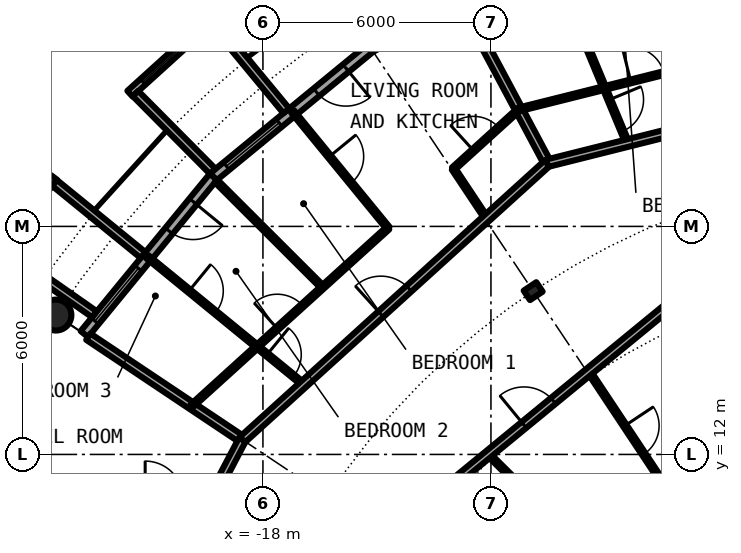
"""IFC4 building model, lengths in metres.
Left out: names, types, materials, properties, quantities, classifications, styles, units other than length and angle.
Written with IfcOpenShell. Run it as: python <this file> out.ifc"""

import sys

from ifc_helpers import new_model, si_unit, direction, frame, frame_2d, origin, origin_2d, place, context, subcontext, project, spatial, rectangle, circle, hollow_circle, i_section, extrude, element, fill, save


model = new_model("IFC4")
c1 = context("Model", 3, precision=1e-05, world=origin(), true_north=direction((0.0, 1.0)))
c2 = subcontext(c1, "Body", "Model", "MODEL_VIEW")
j1 = project(units=[si_unit("LENGTHUNIT", "METRE"), si_unit("PLANEANGLEUNIT", "RADIAN")], contexts=[c1])
p1 = place(None, origin())
s1 = spatial("IfcSite", under=j1, at=p1, CompositionType="ELEMENT")
p2 = place(p1, origin())
s2 = spatial("IfcBuilding", under=s1, at=p2, CompositionType="ELEMENT")
p3 = place(p2, frame((0.0, 0.0, 212.7)))
s3 = spatial("IfcBuildingStorey", under=s2, at=p3, CompositionType="ELEMENT", Elevation=212.7)
p4 = place(p3, frame((-23.448, 15.667, 0.0), z_axis=(0.0, 0.0, 1.0), x_axis=(1.0, 0.0, 0.0)))
e1 = element("IfcColumn", 1, at=p4, inside=s3, PredefinedType="COLUMN", context=c2, shape_type="SweptSolid", body=[
    extrude(hollow_circle(Radius=0.406, WallThickness=0.03, at=origin_2d()), origin(), (0.0, 0.0, 1.0), 3.05),
])
p5 = place(p3, frame((-10.889, 16.297, 0.0), z_axis=(0.0, 0.0, 1.0), x_axis=(-0.55557023302, 0.831469612303, 0.0)))
e2 = element("IfcColumn", 2, at=p5, inside=s3, PredefinedType="COLUMN", context=c2, shape_type="SweptSolid", body=[
    extrude(i_section(OverallWidth=0.3, OverallDepth=0.4, WebThickness=0.013, FlangeThickness=0.024, FilletRadius=0.027, at=origin_2d()), origin(), (0.0, 0.0, 1.0), 3.05),
])
p6 = place(p3, frame((-15.167, 22.699, 0.0), z_axis=(0.0, 0.0, 1.0), x_axis=(-0.773019449054, -0.634382322723, 0.0)))
e3 = element("IfcWall", 3, at=p6, inside=s3, PredefinedType="SOLIDWALL", context=c2, shape_type="SweptSolid", body=[
    extrude(rectangle(XDim=5.352, YDim=0.25, at=frame_2d((2.676, 0.0))), origin(), (0.0, 0.0, 1.0), 2.7),
])
p7 = place(p6, frame((0.841, 0.0, 0.0)))
e4 = element("IfcOpeningElement", 4, at=p7, cuts=e3, PredefinedType="OPENING", context=c2, shape_type="SweptSolid", body=[
    extrude(rectangle(XDim=1.0, YDim=2.2, at=frame_2d((0.5, 1.1))), frame((0.0, 0.135, 0.0), z_axis=(0.0, -1.0, 0.0), x_axis=(1.0, 0.0, 0.0)), (0.0, 0.0, 1.0), 0.27),
])
p8 = place(p6, frame((3.111, 0.0, 0.3)))
e5 = element("IfcOpeningElement", 5, at=p8, cuts=e3, PredefinedType="OPENING", context=c2, shape_type="SweptSolid", body=[
    extrude(rectangle(XDim=1.8, YDim=2.1, at=frame_2d((0.9, 1.05))), frame((0.0, 0.135, 0.0), z_axis=(0.0, -1.0, 0.0), x_axis=(1.0, 0.0, 0.0)), (0.0, 0.0, 1.0), 0.27),
])
p9 = place(p3, frame((-19.282, 23.503, -0.03), z_axis=(0.0, 0.0, 1.0), x_axis=(-0.740998365753, -0.671506829416, 0.0)))
e6 = element("IfcWall", 6, at=p9, inside=s3, PredefinedType="SOLIDWALL", context=c2, shape_type="SweptSolid", body=[
    extrude(rectangle(XDim=2.993, YDim=0.2, at=frame_2d((1.497, 0.0))), origin(), (0.0, 0.0, 1.0), 2.73),
])
p10 = place(p9, frame((0.457, 0.0, 0.33)))
e7 = element("IfcOpeningElement", 7, at=p10, cuts=e6, PredefinedType="OPENING", context=c2, shape_type="SweptSolid", body=[
    extrude(circle(Radius=1.04, at=frame_2d((1.04, 1.04))), frame((0.0, 0.11, 0.0), z_axis=(0.0, -1.0, 0.0), x_axis=(1.0, 0.0, 0.0)), (0.0, 0.0, 1.0), 0.22),
])
p11 = place(p3, frame((-17.384, 21.041, -0.03), z_axis=(0.0, 0.0, 1.0), x_axis=(-0.63709551667, 0.770784861449, 0.0)))
e8 = element("IfcWall", 8, at=p11, inside=s3, PredefinedType="SOLIDWALL", context=c2, shape_type="SweptSolid", body=[
    extrude(rectangle(XDim=3.006, YDim=0.2, at=frame_2d((1.503, 0.0))), origin(), (0.0, 0.0, 1.0), 2.73),
])
p12 = place(p3, frame((-19.323, 19.45, -0.03), z_axis=(0.0, 0.0, 1.0), x_axis=(-0.704476739375, 0.709727076896, 0.0)))
e9 = element("IfcWall", 9, at=p12, inside=s3, PredefinedType="SOLIDWALL", context=c2, shape_type="SweptSolid", body=[
    extrude(rectangle(XDim=2.883, YDim=0.2, at=frame_2d((1.441, 0.0))), origin(), (0.0, 0.0, 1.0), 2.73),
])
p13 = place(p3, frame((-19.304, 19.304, 0.0), z_axis=(0.0, 0.0, 1.0), x_axis=(-0.634382322723, -0.773019449054, 0.0)))
e10 = element("IfcWall", 10, at=p13, inside=s3, PredefinedType="SOLIDWALL", context=c2, shape_type="SweptSolid", body=[
    extrude(rectangle(XDim=5.352, YDim=0.25, at=frame_2d((2.676, 0.0))), origin(), (0.0, 0.0, 1.0), 2.7),
])
p14 = place(p13, frame((0.841, 0.0, 0.0)))
e11 = element("IfcOpeningElement", 11, at=p14, cuts=e10, PredefinedType="OPENING", context=c2, shape_type="SweptSolid", body=[
    extrude(rectangle(XDim=1.0, YDim=2.2, at=frame_2d((0.5, 1.1))), frame((0.0, 0.135, 0.0), z_axis=(0.0, -1.0, 0.0), x_axis=(1.0, 0.0, 0.0)), (0.0, 0.0, 1.0), 0.27),
])
p15 = place(p13, frame((3.111, 0.0, 0.3)))
e12 = element("IfcOpeningElement", 12, at=p15, cuts=e10, PredefinedType="OPENING", context=c2, shape_type="SweptSolid", body=[
    extrude(rectangle(XDim=1.8, YDim=2.1, at=frame_2d((0.9, 1.05))), frame((0.0, 0.135, 0.0), z_axis=(0.0, -1.0, 0.0), x_axis=(1.0, 0.0, 0.0)), (0.0, 0.0, 1.0), 0.27),
])
p16 = place(p3, frame((-23.497, 19.289, -0.03), z_axis=(0.0, 0.0, 1.0), x_axis=(-0.602806268067, -0.797887588059, 0.0)))
e13 = element("IfcWall", 13, at=p16, inside=s3, PredefinedType="SOLIDWALL", context=c2, shape_type="SweptSolid", body=[
    extrude(rectangle(XDim=2.447, YDim=0.2, at=frame_2d((1.223, 0.0))), origin(), (0.0, 0.0, 1.0), 2.73),
])
p17 = place(p16, frame((0.183, 0.0, 0.33)))
e14 = element("IfcOpeningElement", 14, at=p17, cuts=e13, PredefinedType="OPENING", context=c2, shape_type="SweptSolid", body=[
    extrude(circle(Radius=1.04, at=frame_2d((1.04, 1.04))), frame((0.0, 0.11, 0.0), z_axis=(0.0, -1.0, 0.0), x_axis=(1.0, 0.0, 0.0)), (0.0, 0.0, 1.0), 0.22),
])
p18 = place(p3, frame((-21.155, 17.246, -0.03), z_axis=(0.0, 0.0, 1.0), x_axis=(-0.775179004516, 0.631741648902, 0.0)))
e15 = element("IfcWall", 15, at=p18, inside=s3, PredefinedType="SOLIDWALL", context=c2, shape_type="SweptSolid", body=[
    extrude(rectangle(XDim=3.006, YDim=0.2, at=frame_2d((1.503, 0.0))), origin(), (0.0, 0.0, 1.0), 2.73),
])
p19 = place(p3, frame((-22.433, 15.688, -0.03), z_axis=(0.0, 0.0, 1.0), x_axis=(-0.819373043115, 0.573260687834, 0.0)))
e16 = element("IfcWall", 16, at=p19, inside=s3, PredefinedType="SOLIDWALL", context=c2, shape_type="SweptSolid", body=[
    extrude(rectangle(XDim=2.925, YDim=0.2, at=frame_2d((1.463, 0.0))), origin(), (0.0, 0.0, 1.0), 2.73),
])
p20 = place(p3, frame((-10.446, 25.086, 0.0), z_axis=(0.0, 0.0, 1.0), x_axis=(0.38420646001, -0.923247202046, 0.0)))
e17 = element("IfcWall", 17, at=p20, inside=s3, PredefinedType="PARTITIONING", context=c2, shape_type="SweptSolid", body=[
    extrude(rectangle(XDim=5.3, YDim=0.1, at=frame_2d((2.65, 0.0))), origin(), (0.0, 0.0, 1.0), 2.7),
])
p21 = place(p20, frame((4.065, 0.0, 0.0)))
e18 = element("IfcOpeningElement", 18, at=p21, cuts=e17, PredefinedType="OPENING", context=c2, shape_type="SweptSolid", body=[
    extrude(rectangle(XDim=0.9, YDim=2.3, at=frame_2d((0.45, 1.15))), frame((0.0, 0.06, 0.0), z_axis=(0.0, -1.0, 0.0), x_axis=(1.0, 0.0, 0.0)), (0.0, 0.0, 1.0), 0.12),
])
p22 = place(p20, frame((1.415, 0.0, 0.0)))
e19 = element("IfcOpeningElement", 19, at=p22, cuts=e17, PredefinedType="OPENING", context=c2, shape_type="SweptSolid", body=[
    extrude(rectangle(XDim=0.9, YDim=2.3, at=frame_2d((0.45, 1.15))), frame((0.0, 0.06, 0.0), z_axis=(0.0, -1.0, 0.0), x_axis=(1.0, 0.0, 0.0)), (0.0, 0.0, 1.0), 0.12),
])
p23 = place(p3, frame((-22.595, 15.098, 0.0), z_axis=(0.0, 0.0, 1.0), x_axis=(0.831387096605, -0.55569370664, 0.0)))
e20 = element("IfcWall", 20, at=p23, inside=s3, PredefinedType="PARTITIONING", context=c2, shape_type="SweptSolid", body=[
    extrude(rectangle(XDim=4.875, YDim=0.2, at=frame_2d((2.438, 0.0))), origin(), (0.0, 0.0, 1.0), 2.7),
])
p24 = place(p3, frame((-21.04, 17.199, 0.0), z_axis=(0.0, 0.0, 1.0), x_axis=(0.774310172558, -0.632806255241, 0.0)))
e21 = element("IfcWall", 21, at=p24, inside=s3, PredefinedType="PARTITIONING", context=c2, shape_type="SweptSolid", body=[
    extrude(rectangle(XDim=5.3, YDim=0.1, at=frame_2d((2.65, 0.0))), origin(), (0.0, 0.0, 1.0), 2.7),
])
p25 = place(p24, frame((4.066, 0.0, 0.0)))
e22 = element("IfcOpeningElement", 22, at=p25, cuts=e21, PredefinedType="OPENING", context=c2, shape_type="SweptSolid", body=[
    extrude(rectangle(XDim=0.9, YDim=2.3, at=frame_2d((0.45, 1.15))), frame((0.0, 0.06, 0.0), z_axis=(0.0, -1.0, 0.0), x_axis=(1.0, 0.0, 0.0)), (0.0, 0.0, 1.0), 0.12),
])
p26 = place(p24, frame((1.416, 0.0, 0.0)))
e23 = element("IfcOpeningElement", 23, at=p26, cuts=e21, PredefinedType="OPENING", context=c2, shape_type="SweptSolid", body=[
    extrude(rectangle(XDim=0.9, YDim=2.3, at=frame_2d((0.45, 1.15))), frame((0.0, 0.06, 0.0), z_axis=(0.0, -1.0, 0.0), x_axis=(1.0, 0.0, 0.0)), (0.0, 0.0, 1.0), 0.12),
])
p27 = place(p3, frame((-19.234, 19.197, 0.0), z_axis=(0.0, 0.0, 1.0), x_axis=(0.707722727509, -0.706490297858, 0.0)))
e24 = element("IfcWall", 24, at=p27, inside=s3, PredefinedType="PARTITIONING", context=c2, shape_type="SweptSolid", body=[
    extrude(rectangle(XDim=3.962, YDim=0.1, at=frame_2d((1.981, 0.0))), origin(), (0.0, 0.0, 1.0), 2.7),
])
p28 = place(p3, frame((-17.219, 21.023, 0.0), z_axis=(0.0, 0.0, 1.0), x_axis=(0.633590098448, -0.773668913133, 0.0)))
e25 = element("IfcWall", 25, at=p28, inside=s3, PredefinedType="PARTITIONING", context=c2, shape_type="SweptSolid", body=[
    extrude(rectangle(XDim=3.962, YDim=0.1, at=frame_2d((1.981, 0.0))), origin(), (0.0, 0.0, 1.0), 2.7),
])
p29 = place(p28, frame((1.531, 0.0, 0.0)))
e26 = element("IfcOpeningElement", 26, at=p29, cuts=e25, PredefinedType="OPENING", context=c2, shape_type="SweptSolid", body=[
    extrude(rectangle(XDim=0.9, YDim=2.3, at=frame_2d((0.45, 1.15))), frame((0.0, 0.06, 0.0), z_axis=(0.0, -1.0, 0.0), x_axis=(1.0, 0.0, 0.0)), (0.0, 0.0, 1.0), 0.12),
])
p30 = place(p3, frame((-12.988, 19.518, 0.0), z_axis=(0.0, 0.0, 1.0), x_axis=(0.554125989098, -0.832432813028, 0.0)))
e27 = element("IfcWall", 27, at=p30, inside=s3, PredefinedType="PARTITIONING", context=c2, shape_type="SweptSolid", body=[
    extrude(rectangle(XDim=1.57, YDim=0.1, at=frame_2d((0.785, 0.0))), origin(), (0.0, 0.0, 1.0), 2.7),
])
p31 = place(p3, frame((-12.809, 23.966, 0.0), z_axis=(0.0, 0.0, 1.0), x_axis=(0.471271812246, -0.881988026553, 0.0)))
e28 = element("IfcWall", 28, at=p31, inside=s3, PredefinedType="PARTITIONING", context=c2, shape_type="SweptSolid", body=[
    extrude(rectangle(XDim=4.874, YDim=0.2, at=frame_2d((2.437, 0.0))), origin(), (0.0, 0.0, 1.0), 2.7),
])
p32 = place(p3, frame((-12.069, 12.007, 0.0), z_axis=(0.0, 0.0, 1.0), x_axis=(0.708909651863, -0.705299302067, 0.0)))
e29 = element("IfcWall", 29, at=p32, inside=s3, PredefinedType="PARTITIONING", context=c2, shape_type="SweptSolid", body=[
    extrude(rectangle(XDim=4.193, YDim=0.1, at=frame_2d((2.096, 0.0))), origin(), (0.0, 0.0, 1.0), 2.7),
])
p33 = place(p32, frame((1.646, 0.0, 0.0)))
e30 = element("IfcOpeningElement", 30, at=p33, cuts=e29, PredefinedType="OPENING", context=c2, shape_type="SweptSolid", body=[
    extrude(rectangle(XDim=0.9, YDim=2.3, at=frame_2d((0.45, 1.15))), frame((0.0, 0.06, 0.0), z_axis=(0.0, -1.0, 0.0), x_axis=(1.0, 0.0, 0.0)), (0.0, 0.0, 1.0), 0.12),
])
p34 = place(p3, frame((-9.421, 14.18, 0.0), z_axis=(0.0, 0.0, 1.0), x_axis=(0.553303732327, -0.832979579457, 0.0)))
e31 = element("IfcWall", 31, at=p34, inside=s3, PredefinedType="PARTITIONING", context=c2, shape_type="SweptSolid", body=[
    extrude(rectangle(XDim=4.319, YDim=0.1, at=frame_2d((2.16, 0.0))), origin(), (0.0, 0.0, 1.0), 2.7),
])
p35 = place(p34, frame((1.71, 0.0, 0.0)))
e32 = element("IfcOpeningElement", 32, at=p35, cuts=e31, PredefinedType="OPENING", context=c2, shape_type="SweptSolid", body=[
    extrude(rectangle(XDim=0.9, YDim=2.3, at=frame_2d((0.45, 1.15))), frame((0.0, 0.06, 0.0), z_axis=(0.0, -1.0, 0.0), x_axis=(1.0, 0.0, 0.0)), (0.0, 0.0, 1.0), 0.12),
])
p36 = place(p3, frame((-7.914, 25.997, 0.0), z_axis=(0.0, 0.0, 1.0), x_axis=(0.291291575636, -0.956634317785, 0.0)))
e33 = element("IfcWall", 33, at=p36, inside=s3, PredefinedType="PARTITIONING", context=c2, shape_type="SweptSolid", body=[
    extrude(rectangle(XDim=3.962, YDim=0.1, at=frame_2d((1.981, 0.0))), origin(), (0.0, 0.0, 1.0), 2.7),
])
p37 = place(p3, frame((-14.717, 9.834, 0.0), z_axis=(0.0, 0.0, 1.0), x_axis=(0.773034536097, 0.634363938131, 0.0)))
e34 = element("IfcWall", 34, at=p37, inside=s3, PredefinedType="PARTITIONING", context=c2, shape_type="SweptSolid", body=[
    extrude(rectangle(XDim=10.277, YDim=0.2, at=frame_2d((5.138, 0.0))), origin(), (0.0, 0.0, 1.0), 2.7),
])
p38 = place(p37, frame((4.638, 0.0, 0.0)))
e35 = element("IfcOpeningElement", 35, at=p38, cuts=e34, PredefinedType="OPENING", context=c2, shape_type="SweptSolid", body=[
    extrude(rectangle(XDim=1.0, YDim=2.3, at=frame_2d((0.5, 1.15))), frame((0.0, 0.11, 0.0), z_axis=(0.0, -1.0, 0.0), x_axis=(1.0, 0.0, 0.0)), (0.0, 0.0, 1.0), 0.22),
])
p39 = place(p3, frame((-18.543, 12.386, 0.0), z_axis=(0.0, 0.0, 1.0), x_axis=(0.740853508928, 0.671666642248, 0.0)))
e36 = element("IfcWall", 36, at=p39, inside=s3, PredefinedType="PARTITIONING", context=c2, shape_type="SweptSolid", body=[
    extrude(rectangle(XDim=10.84, YDim=0.2, at=frame_2d((5.42, 0.0))), origin(), (0.0, 0.0, 1.0), 2.7),
])
p40 = place(p39, frame((4.921, 0.0, 0.0)))
e37 = element("IfcOpeningElement", 37, at=p40, cuts=e36, PredefinedType="OPENING", context=c2, shape_type="SweptSolid", body=[
    extrude(rectangle(XDim=1.0, YDim=2.3, at=frame_2d((0.5, 1.15))), frame((0.0, 0.11, 0.0), z_axis=(0.0, -1.0, 0.0), x_axis=(1.0, 0.0, 0.0)), (0.0, 0.0, 1.0), 0.22),
])
p41 = place(p3, frame((-10.521, 19.662, 0.0), z_axis=(0.0, 0.0, 1.0), x_axis=(0.969975443945, 0.243202874456, 0.0)))
e38 = element("IfcWall", 38, at=p41, inside=s3, PredefinedType="PARTITIONING", context=c2, shape_type="SweptSolid", body=[
    extrude(rectangle(XDim=10.847, YDim=0.2, at=frame_2d((5.423, 0.0))), origin(), (0.0, 0.0, 1.0), 2.7),
])
p42 = place(p41, frame((4.928, 0.0, 0.0)))
e39 = element("IfcOpeningElement", 39, at=p42, cuts=e38, PredefinedType="OPENING", context=c2, shape_type="SweptSolid", body=[
    extrude(rectangle(XDim=1.0, YDim=2.3, at=frame_2d((0.5, 1.15))), frame((0.0, 0.11, 0.0), z_axis=(0.0, -1.0, 0.0), x_axis=(1.0, 0.0, 0.0)), (0.0, 0.0, 1.0), 0.22),
])
p43 = place(p3, frame((-19.317, 10.915, 0.0), z_axis=(0.0, 0.0, 1.0), x_axis=(0.465359652486, 0.885121683068, 0.0)))
e40 = element("IfcWall", 40, at=p43, inside=s3, PredefinedType="PARTITIONING", context=c2, shape_type="SweptSolid", body=[
    extrude(rectangle(XDim=1.665, YDim=0.2, at=frame_2d((0.833, 0.0))), origin(), (0.0, 0.0, 1.0), 2.7),
])
p44 = place(p3, frame((-19.872, 13.278, 0.0), z_axis=(0.0, 0.0, 1.0), x_axis=(0.740923753351, 0.671589153962, 0.0)))
e41 = element("IfcWall", 41, at=p44, inside=s3, PredefinedType="PARTITIONING", context=c2, shape_type="SweptSolid", body=[
    extrude(rectangle(XDim=6.969, YDim=0.1, at=frame_2d((3.484, 0.0))), origin(), (0.0, 0.0, 1.0), 2.7),
])
p45 = place(p44, frame((3.034, 0.0, 0.0)))
e42 = element("IfcOpeningElement", 42, at=p45, cuts=e41, PredefinedType="OPENING", context=c2, shape_type="SweptSolid", body=[
    extrude(rectangle(XDim=0.9, YDim=2.3, at=frame_2d((0.45, 1.15))), frame((0.0, 0.06, 0.0), z_axis=(0.0, -1.0, 0.0), x_axis=(1.0, 0.0, 0.0)), (0.0, 0.0, 1.0), 0.12),
])
p46 = place(p3, frame((-12.993, 19.513, 0.0), z_axis=(0.0, 0.0, 1.0), x_axis=(0.74087097024, 0.671647381783, 0.0)))
e43 = element("IfcWall", 43, at=p46, inside=s3, PredefinedType="PARTITIONING", context=c2, shape_type="SweptSolid", body=[
    extrude(rectangle(XDim=2.324, YDim=0.1, at=frame_2d((1.162, 0.0))), origin(), (0.0, 0.0, 1.0), 2.7),
])
p47 = place(p46, frame((0.719, 0.0, 0.0)))
e44 = element("IfcOpeningElement", 44, at=p47, cuts=e43, PredefinedType="OPENING", context=c2, shape_type="SweptSolid", body=[
    extrude(rectangle(XDim=0.9, YDim=2.3, at=frame_2d((0.45, 1.15))), frame((0.0, 0.06, 0.0), z_axis=(0.0, -1.0, 0.0), x_axis=(1.0, 0.0, 0.0)), (0.0, 0.0, 1.0), 0.12),
])
p48 = place(p3, frame((-11.266, 21.078, 0.0), z_axis=(0.0, 0.0, 1.0), x_axis=(0.970072433546, 0.242815719578, 0.0)))
e45 = element("IfcWall", 45, at=p48, inside=s3, PredefinedType="PARTITIONING", context=c2, shape_type="SweptSolid", body=[
    extrude(rectangle(XDim=6.973, YDim=0.1, at=frame_2d((3.486, 0.0))), origin(), (0.0, 0.0, 1.0), 2.7),
])
p49 = place(p48, frame((3.036, 0.0, 0.0)))
e46 = element("IfcOpeningElement", 46, at=p49, cuts=e45, PredefinedType="OPENING", context=c2, shape_type="SweptSolid", body=[
    extrude(rectangle(XDim=0.9, YDim=2.3, at=frame_2d((0.45, 1.15))), frame((0.0, 0.06, 0.0), z_axis=(0.0, -1.0, 0.0), x_axis=(1.0, 0.0, 0.0)), (0.0, 0.0, 1.0), 0.12),
])
p50 = place(p7, origin())
e47 = element("IfcDoor", 47, at=p50, inside=s3, OperationType="SINGLE_SWING_LEFT", PredefinedType="DOOR", context=c2, shape_type="SweptSolid", body=[
    extrude(rectangle(XDim=1.0, YDim=2.2, at=frame_2d((0.5, 1.1))), frame((0.0, 0.025, 0.0), z_axis=(0.0, -1.0, 0.0), x_axis=(1.0, 0.0, 0.0)), (0.0, 0.0, 1.0), 0.05),
])
fill(e4, e47)
p51 = place(p8, origin())
e48 = element("IfcWindow", 48, at=p51, inside=s3, PartitioningType="SINGLE_PANEL", PredefinedType="WINDOW", context=c2, shape_type="SweptSolid", body=[
    extrude(rectangle(XDim=1.8, YDim=2.1, at=frame_2d((0.9, 1.05))), frame((0.0, 0.03, 0.0), z_axis=(0.0, -1.0, 0.0), x_axis=(1.0, 0.0, 0.0)), (0.0, 0.0, 1.0), 0.06),
])
fill(e5, e48)
p52 = place(p10, origin())
e49 = element("IfcWindow", 49, at=p52, inside=s3, PartitioningType="SINGLE_PANEL", PredefinedType="WINDOW", context=c2, shape_type="SweptSolid", body=[
    extrude(circle(Radius=1.04, at=frame_2d((1.04, 1.04))), frame((0.0, 0.03, 0.0), z_axis=(0.0, -1.0, 0.0), x_axis=(1.0, 0.0, 0.0)), (0.0, 0.0, 1.0), 0.06),
])
fill(e7, e49)
p53 = place(p14, origin())
e50 = element("IfcDoor", 50, at=p53, inside=s3, OperationType="SINGLE_SWING_LEFT", PredefinedType="DOOR", context=c2, shape_type="SweptSolid", body=[
    extrude(rectangle(XDim=1.0, YDim=2.2, at=frame_2d((0.5, 1.1))), frame((0.0, 0.025, 0.0), z_axis=(0.0, -1.0, 0.0), x_axis=(1.0, 0.0, 0.0)), (0.0, 0.0, 1.0), 0.05),
])
fill(e11, e50)
p54 = place(p15, origin())
e51 = element("IfcWindow", 51, at=p54, inside=s3, PartitioningType="SINGLE_PANEL", PredefinedType="WINDOW", context=c2, shape_type="SweptSolid", body=[
    extrude(rectangle(XDim=1.8, YDim=2.1, at=frame_2d((0.9, 1.05))), frame((0.0, 0.03, 0.0), z_axis=(0.0, -1.0, 0.0), x_axis=(1.0, 0.0, 0.0)), (0.0, 0.0, 1.0), 0.06),
])
fill(e12, e51)
p55 = place(p21, origin())
e52 = element("IfcDoor", 52, at=p55, inside=s3, OperationType="SINGLE_SWING_RIGHT", PredefinedType="DOOR", context=c2, shape_type="SweptSolid", body=[
    extrude(rectangle(XDim=0.9, YDim=2.3, at=frame_2d((0.45, 1.15))), frame((0.0, 0.025, 0.0), z_axis=(0.0, -1.0, 0.0), x_axis=(1.0, 0.0, 0.0)), (0.0, 0.0, 1.0), 0.05),
])
fill(e18, e52)
p56 = place(p49, origin())
e53 = element("IfcDoor", 53, at=p56, inside=s3, OperationType="SINGLE_SWING_LEFT", PredefinedType="DOOR", context=c2, shape_type="SweptSolid", body=[
    extrude(rectangle(XDim=0.9, YDim=2.3, at=frame_2d((0.45, 1.15))), frame((0.0, 0.025, 0.0), z_axis=(0.0, -1.0, 0.0), x_axis=(1.0, 0.0, 0.0)), (0.0, 0.0, 1.0), 0.05),
])
fill(e46, e53)
p57 = place(p40, origin())
e54 = element("IfcDoor", 54, at=p57, inside=s3, OperationType="SINGLE_SWING_RIGHT", PredefinedType="DOOR", context=c2, shape_type="SweptSolid", body=[
    extrude(rectangle(XDim=1.0, YDim=2.3, at=frame_2d((0.5, 1.15))), frame((0.0, 0.025, 0.0), z_axis=(0.0, -1.0, 0.0), x_axis=(1.0, 0.0, 0.0)), (0.0, 0.0, 1.0), 0.05),
])
fill(e37, e54)
p58 = place(p47, origin())
e55 = element("IfcDoor", 55, at=p58, inside=s3, OperationType="SINGLE_SWING_RIGHT", PredefinedType="DOOR", context=c2, shape_type="SweptSolid", body=[
    extrude(rectangle(XDim=0.9, YDim=2.3, at=frame_2d((0.45, 1.15))), frame((0.0, 0.025, 0.0), z_axis=(0.0, -1.0, 0.0), x_axis=(1.0, 0.0, 0.0)), (0.0, 0.0, 1.0), 0.05),
])
fill(e44, e55)
p59 = place(p25, origin())
e56 = element("IfcDoor", 56, at=p59, inside=s3, OperationType="SINGLE_SWING_RIGHT", PredefinedType="DOOR", context=c2, shape_type="SweptSolid", body=[
    extrude(rectangle(XDim=0.9, YDim=2.3, at=frame_2d((0.45, 1.15))), frame((0.0, 0.025, 0.0), z_axis=(0.0, -1.0, 0.0), x_axis=(1.0, 0.0, 0.0)), (0.0, 0.0, 1.0), 0.05),
])
fill(e22, e56)
p60 = place(p29, origin())
e57 = element("IfcDoor", 57, at=p60, inside=s3, OperationType="SINGLE_SWING_LEFT", PredefinedType="DOOR", context=c2, shape_type="SweptSolid", body=[
    extrude(rectangle(XDim=0.9, YDim=2.3, at=frame_2d((0.45, 1.15))), frame((0.0, 0.025, 0.0), z_axis=(0.0, -1.0, 0.0), x_axis=(1.0, 0.0, 0.0)), (0.0, 0.0, 1.0), 0.05),
])
fill(e26, e57)
p61 = place(p45, origin())
e58 = element("IfcDoor", 58, at=p61, inside=s3, OperationType="SINGLE_SWING_RIGHT", PredefinedType="DOOR", context=c2, shape_type="SweptSolid", body=[
    extrude(rectangle(XDim=0.9, YDim=2.3, at=frame_2d((0.45, 1.15))), frame((0.0, 0.025, 0.0), z_axis=(0.0, -1.0, 0.0), x_axis=(1.0, 0.0, 0.0)), (0.0, 0.0, 1.0), 0.05),
])
fill(e42, e58)
p62 = place(p26, origin())
e59 = element("IfcDoor", 59, at=p62, inside=s3, OperationType="SINGLE_SWING_LEFT", PredefinedType="DOOR", context=c2, shape_type="SweptSolid", body=[
    extrude(rectangle(XDim=0.9, YDim=2.3, at=frame_2d((0.45, 1.15))), frame((0.0, 0.025, 0.0), z_axis=(0.0, -1.0, 0.0), x_axis=(1.0, 0.0, 0.0)), (0.0, 0.0, 1.0), 0.05),
])
fill(e23, e59)
p63 = place(p38, origin())
e60 = element("IfcDoor", 60, at=p63, inside=s3, OperationType="SINGLE_SWING_LEFT", PredefinedType="DOOR", context=c2, shape_type="SweptSolid", body=[
    extrude(rectangle(XDim=1.0, YDim=2.3, at=frame_2d((0.5, 1.15))), frame((0.0, 0.025, 0.0), z_axis=(0.0, -1.0, 0.0), x_axis=(1.0, 0.0, 0.0)), (0.0, 0.0, 1.0), 0.05),
])
fill(e35, e60)
p64 = place(p35, origin())
e61 = element("IfcDoor", 61, at=p64, inside=s3, OperationType="SINGLE_SWING_RIGHT", PredefinedType="DOOR", context=c2, shape_type="SweptSolid", body=[
    extrude(rectangle(XDim=0.9, YDim=2.3, at=frame_2d((0.45, 1.15))), frame((0.0, 0.025, 0.0), z_axis=(0.0, -1.0, 0.0), x_axis=(1.0, 0.0, 0.0)), (0.0, 0.0, 1.0), 0.05),
])
fill(e32, e61)
save(model, sys.argv[1])
